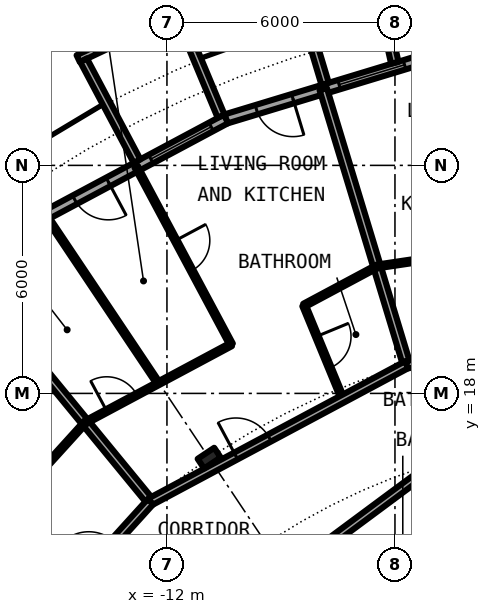
"""IFC4 building model, lengths in metres.
Left out: names, types, materials, properties, quantities, classifications, styles, units other than length and angle.
Written with IfcOpenShell. Run it as: python <this file> out.ifc"""

import sys

from ifc_helpers import new_model, si_unit, direction, frame, frame_2d, origin, origin_2d, place, context, subcontext, project, spatial, rectangle, circle, i_section, extrude, element, fill, save


model = new_model("IFC4")
c1 = context("Model", 3, precision=1e-05, world=origin(), true_north=direction((0.0, 1.0)))
c2 = subcontext(c1, "Body", "Model", "MODEL_VIEW")
j1 = project(units=[si_unit("LENGTHUNIT", "METRE"), si_unit("PLANEANGLEUNIT", "RADIAN")], contexts=[c1])
p1 = place(None, origin())
s1 = spatial("IfcSite", under=j1, at=p1, CompositionType="ELEMENT")
p2 = place(p1, origin())
s2 = spatial("IfcBuilding", under=s1, at=p2, CompositionType="ELEMENT")
p3 = place(p2, frame((0.0, 0.0, 75.8)))
s3 = spatial("IfcBuildingStorey", under=s2, at=p3, CompositionType="ELEMENT", Elevation=75.8)
p4 = place(p3, frame((-10.889, 16.297, 0.0), z_axis=(0.0, 0.0, 1.0), x_axis=(-0.55557023302, 0.831469612303, 0.0)))
e1 = element("IfcColumn", 1, at=p4, inside=s3, PredefinedType="COLUMN", context=c2, shape_type="SweptSolid", body=[
    extrude(i_section(OverallWidth=0.306, OverallDepth=0.524, WebThickness=0.021, FlangeThickness=0.04, FilletRadius=0.027, at=origin_2d()), origin(), (0.0, 0.0, 1.0), 3.05),
])
p5 = place(p3, frame((-5.326, 26.775, 0.0), z_axis=(0.0, 0.0, 1.0), x_axis=(-0.956965678721, -0.290201119486, 0.0)))
e2 = element("IfcWall", 2, at=p5, inside=s3, PredefinedType="SOLIDWALL", context=c2, shape_type="SweptSolid", body=[
    extrude(rectangle(XDim=5.351, YDim=0.25, at=frame_2d((2.676, 0.0))), origin(), (0.0, 0.0, 1.0), 2.7),
])
p6 = place(p5, frame((0.441, 0.0, 0.3)))
e3 = element("IfcOpeningElement", 3, at=p6, cuts=e2, PredefinedType="OPENING", context=c2, shape_type="SweptSolid", body=[
    extrude(rectangle(XDim=1.8, YDim=2.1, at=frame_2d((0.9, 1.05))), frame((0.0, 0.135, 0.0), z_axis=(0.0, -1.0, 0.0), x_axis=(1.0, 0.0, 0.0)), (0.0, 0.0, 1.0), 0.27),
])
p7 = place(p5, frame((3.51, 0.0, 0.0)))
e4 = element("IfcOpeningElement", 4, at=p7, cuts=e2, PredefinedType="OPENING", context=c2, shape_type="SweptSolid", body=[
    extrude(rectangle(XDim=1.0, YDim=2.2, at=frame_2d((0.5, 1.1))), frame((0.0, 0.135, 0.0), z_axis=(0.0, -1.0, 0.0), x_axis=(1.0, 0.0, 0.0)), (0.0, 0.0, 1.0), 0.27),
])
p8 = place(p3, frame((-6.004, 26.7, -0.03), z_axis=(0.0, 0.0, 1.0), x_axis=(-0.219609259383, 0.975587911566, 0.0)))
e5 = element("IfcWall", 5, at=p8, inside=s3, PredefinedType="SOLIDWALL", context=c2, shape_type="SweptSolid", body=[
    extrude(rectangle(XDim=2.933, YDim=0.2, at=frame_2d((1.466, 0.0))), origin(), (0.0, 0.0, 1.0), 2.73),
])
p9 = place(p3, frame((-7.837, 26.144, -0.03), z_axis=(0.0, 0.0, 1.0), x_axis=(-0.287064767992, 0.957911174889, 0.0)))
e6 = element("IfcWall", 6, at=p9, inside=s3, PredefinedType="SOLIDWALL", context=c2, shape_type="SweptSolid", body=[
    extrude(rectangle(XDim=3.006, YDim=0.2, at=frame_2d((1.503, 0.0))), origin(), (0.0, 0.0, 1.0), 2.73),
])
p10 = place(p3, frame((-10.447, 25.222, 0.0), z_axis=(0.0, 0.0, 1.0), x_axis=(-0.881915646801, -0.471407246368, 0.0)))
e7 = element("IfcWall", 7, at=p10, inside=s3, PredefinedType="SOLIDWALL", context=c2, shape_type="SweptSolid", body=[
    extrude(rectangle(XDim=5.352, YDim=0.25, at=frame_2d((2.676, 0.0))), origin(), (0.0, 0.0, 1.0), 2.7),
])
p11 = place(p10, frame((0.441, 0.0, 0.3)))
e8 = element("IfcOpeningElement", 8, at=p11, cuts=e7, PredefinedType="OPENING", context=c2, shape_type="SweptSolid", body=[
    extrude(rectangle(XDim=1.8, YDim=2.1, at=frame_2d((0.9, 1.05))), frame((0.0, 0.135, 0.0), z_axis=(0.0, -1.0, 0.0), x_axis=(1.0, 0.0, 0.0)), (0.0, 0.0, 1.0), 0.27),
])
p12 = place(p10, frame((3.51, 0.0, 0.0)))
e9 = element("IfcOpeningElement", 9, at=p12, cuts=e7, PredefinedType="OPENING", context=c2, shape_type="SweptSolid", body=[
    extrude(rectangle(XDim=1.0, YDim=2.2, at=frame_2d((0.5, 1.1))), frame((0.0, 0.135, 0.0), z_axis=(0.0, -1.0, 0.0), x_axis=(1.0, 0.0, 0.0)), (0.0, 0.0, 1.0), 0.27),
])
p13 = place(p3, frame((-11.629, 28.088, -0.03), z_axis=(0.0, 0.0, 1.0), x_axis=(-0.904000060331, -0.427532327342, 0.0)))
e10 = element("IfcWall", 10, at=p13, inside=s3, PredefinedType="SOLIDWALL", context=c2, shape_type="SweptSolid", body=[
    extrude(rectangle(XDim=2.993, YDim=0.2, at=frame_2d((1.497, 0.0))), origin(), (0.0, 0.0, 1.0), 2.73),
])
p14 = place(p13, frame((0.457, 0.0, 0.33)))
e11 = element("IfcOpeningElement", 11, at=p14, cuts=e10, PredefinedType="OPENING", context=c2, shape_type="SweptSolid", body=[
    extrude(circle(Radius=1.04, at=frame_2d((1.04, 1.04))), frame((0.0, 0.11, 0.0), z_axis=(0.0, -1.0, 0.0), x_axis=(1.0, 0.0, 0.0)), (0.0, 0.0, 1.0), 0.22),
])
p15 = place(p3, frame((-10.575, 25.295, -0.03), z_axis=(0.0, 0.0, 1.0), x_axis=(-0.385697364644, 0.922625353492, 0.0)))
e12 = element("IfcWall", 12, at=p15, inside=s3, PredefinedType="SOLIDWALL", context=c2, shape_type="SweptSolid", body=[
    extrude(rectangle(XDim=2.883, YDim=0.2, at=frame_2d((1.442, 0.0))), origin(), (0.0, 0.0, 1.0), 2.73),
])
p16 = place(p3, frame((-12.787, 24.113, -0.03), z_axis=(0.0, 0.0, 1.0), x_axis=(-0.468365282436, 0.883534924159, 0.0)))
e13 = element("IfcWall", 13, at=p16, inside=s3, PredefinedType="SOLIDWALL", context=c2, shape_type="SweptSolid", body=[
    extrude(rectangle(XDim=3.006, YDim=0.2, at=frame_2d((1.503, 0.0))), origin(), (0.0, 0.0, 1.0), 2.73),
])
p17 = place(p3, frame((-7.887, 26.005, 0.0), z_axis=(0.0, 0.0, 1.0), x_axis=(0.29005838641, -0.957008951094, 0.0)))
e14 = element("IfcWall", 14, at=p17, inside=s3, PredefinedType="PARTITIONING", context=c2, shape_type="SweptSolid", body=[
    extrude(rectangle(XDim=7.574, YDim=0.2, at=frame_2d((3.787, 0.0))), origin(), (0.0, 0.0, 1.0), 2.7),
])
p18 = place(p3, frame((-17.243, 21.005, 0.0), z_axis=(0.0, 0.0, 1.0), x_axis=(0.63447412651, -0.772944100689, 0.0)))
e15 = element("IfcWall", 15, at=p18, inside=s3, PredefinedType="PARTITIONING", context=c2, shape_type="SweptSolid", body=[
    extrude(rectangle(XDim=7.576, YDim=0.2, at=frame_2d((3.788, 0.0))), origin(), (0.0, 0.0, 1.0), 2.7),
])
p19 = place(p3, frame((-15.119, 22.581, 0.0), z_axis=(0.0, 0.0, 1.0), x_axis=(0.556271707676, -0.83100047367, 0.0)))
e16 = element("IfcWall", 16, at=p19, inside=s3, PredefinedType="PARTITIONING", context=c2, shape_type="SweptSolid", body=[
    extrude(rectangle(XDim=5.195, YDim=0.1, at=frame_2d((2.598, 0.0))), origin(), (0.0, 0.0, 1.0), 2.7),
])
p20 = place(p3, frame((-12.81, 23.966, 0.0), z_axis=(0.0, 0.0, 1.0), x_axis=(0.47140999111, -0.881914179658, 0.0)))
e17 = element("IfcWall", 17, at=p20, inside=s3, PredefinedType="PARTITIONING", context=c2, shape_type="SweptSolid", body=[
    extrude(rectangle(XDim=5.303, YDim=0.1, at=frame_2d((2.652, 0.0))), origin(), (0.0, 0.0, 1.0), 2.7),
])
p21 = place(p20, frame((2.202, 0.0, 0.0)))
e18 = element("IfcOpeningElement", 18, at=p21, cuts=e17, PredefinedType="OPENING", context=c2, shape_type="SweptSolid", body=[
    extrude(rectangle(XDim=0.9, YDim=2.3, at=frame_2d((0.45, 1.15))), frame((0.0, 0.06, 0.0), z_axis=(0.0, -1.0, 0.0), x_axis=(1.0, 0.0, 0.0)), (0.0, 0.0, 1.0), 0.12),
])
p22 = place(p3, frame((-8.392, 20.314, 0.0), z_axis=(0.0, 0.0, 1.0), x_axis=(0.38190329031, -0.924202292169, 0.0)))
e19 = element("IfcWall", 19, at=p22, inside=s3, PredefinedType="PARTITIONING", context=c2, shape_type="SweptSolid", body=[
    extrude(rectangle(XDim=2.661, YDim=0.1, at=frame_2d((1.33, 0.0))), origin(), (0.0, 0.0, 1.0), 2.7),
])
p23 = place(p22, frame((0.88, 0.0, 0.0)))
e20 = element("IfcOpeningElement", 20, at=p23, cuts=e19, PredefinedType="OPENING", context=c2, shape_type="SweptSolid", body=[
    extrude(rectangle(XDim=0.9, YDim=2.3, at=frame_2d((0.45, 1.15))), frame((0.0, 0.06, 0.0), z_axis=(0.0, -1.0, 0.0), x_axis=(1.0, 0.0, 0.0)), (0.0, 0.0, 1.0), 0.12),
])
p24 = place(p3, frame((-12.745, 10.358, 0.0), z_axis=(0.0, 0.0, 1.0), x_axis=(0.803191461888, 0.595720971219, 0.0)))
e21 = element("IfcWall", 21, at=p24, inside=s3, PredefinedType="PARTITIONING", context=c2, shape_type="SweptSolid", body=[
    extrude(rectangle(XDim=9.76, YDim=0.2, at=frame_2d((4.88, 0.0))), origin(), (0.0, 0.0, 1.0), 2.7),
])
p25 = place(p24, frame((4.38, 0.0, 0.0)))
e22 = element("IfcOpeningElement", 22, at=p25, cuts=e21, PredefinedType="OPENING", context=c2, shape_type="SweptSolid", body=[
    extrude(rectangle(XDim=1.0, YDim=2.3, at=frame_2d((0.5, 1.15))), frame((0.0, 0.11, 0.0), z_axis=(0.0, -1.0, 0.0), x_axis=(1.0, 0.0, 0.0)), (0.0, 0.0, 1.0), 0.22),
])
p26 = place(p3, frame((-12.434, 15.151, 0.0), z_axis=(0.0, 0.0, 1.0), x_axis=(0.881899173092, 0.47143806433, 0.0)))
e23 = element("IfcWall", 23, at=p26, inside=s3, PredefinedType="PARTITIONING", context=c2, shape_type="SweptSolid", body=[
    extrude(rectangle(XDim=7.647, YDim=0.2, at=frame_2d((3.824, 0.0))), origin(), (0.0, 0.0, 1.0), 2.38),
])
p27 = place(p26, frame((2.55, 0.0, 0.0)))
e24 = element("IfcOpeningElement", 24, at=p27, cuts=e23, PredefinedType="OPENING", context=c2, shape_type="SweptSolid", body=[
    extrude(rectangle(XDim=1.0, YDim=2.3, at=frame_2d((0.5, 1.15))), frame((0.0, 0.11, 0.0), z_axis=(0.0, -1.0, 0.0), x_axis=(1.0, 0.0, 0.0)), (0.0, 0.0, 1.0), 0.22),
])
p28 = place(p3, frame((-16.193, 11.004, 0.0), z_axis=(0.0, 0.0, 1.0), x_axis=(0.671601747072, 0.740912338492, 0.0)))
e25 = element("IfcWall", 25, at=p28, inside=s3, PredefinedType="PARTITIONING", context=c2, shape_type="SweptSolid", body=[
    extrude(rectangle(XDim=5.597, YDim=0.2, at=frame_2d((2.799, 0.0))), origin(), (0.0, 0.0, 1.0), 2.38),
])
p29 = place(p28, frame((3.18, 0.0, 0.0)))
e26 = element("IfcOpeningElement", 26, at=p29, cuts=e25, PredefinedType="OPENING", context=c2, shape_type="SweptSolid", body=[
    extrude(rectangle(XDim=1.0, YDim=2.3, at=frame_2d((0.5, 1.15))), frame((0.0, 0.11, 0.0), z_axis=(0.0, -1.0, 0.0), x_axis=(1.0, 0.0, 0.0)), (0.0, 0.0, 1.0), 0.22),
])
p30 = place(p3, frame((-5.69, 18.756, 0.0), z_axis=(0.0, 0.0, 1.0), x_axis=(0.989265547993, 0.146128968906, 0.0)))
e27 = element("IfcWall", 27, at=p30, inside=s3, PredefinedType="PARTITIONING", context=c2, shape_type="SweptSolid", body=[
    extrude(rectangle(XDim=1.771, YDim=0.2, at=frame_2d((0.885, 0.0))), origin(), (0.0, 0.0, 1.0), 2.38),
])
p31 = place(p3, frame((-14.148, 17.236, 0.0), z_axis=(0.0, 0.0, 1.0), x_axis=(0.881763472003, 0.471691826769, 0.0)))
e28 = element("IfcWall", 28, at=p31, inside=s3, PredefinedType="PARTITIONING", context=c2, shape_type="SweptSolid", body=[
    extrude(rectangle(XDim=4.35, YDim=0.1, at=frame_2d((2.175, 0.0))), origin(), (0.0, 0.0, 1.0), 2.7),
])
p32 = place(p31, frame((0.639, 0.0, 0.0)))
e29 = element("IfcOpeningElement", 29, at=p32, cuts=e28, PredefinedType="OPENING", context=c2, shape_type="SweptSolid", body=[
    extrude(rectangle(XDim=0.9, YDim=2.3, at=frame_2d((0.45, 1.15))), frame((0.0, 0.06, 0.0), z_axis=(0.0, -1.0, 0.0), x_axis=(1.0, 0.0, 0.0)), (0.0, 0.0, 1.0), 0.12),
])
p33 = place(p3, frame((-8.392, 20.314, 0.0), z_axis=(0.0, 0.0, 1.0), x_axis=(0.881864921102, 0.471502132476, 0.0)))
e30 = element("IfcWall", 30, at=p33, inside=s3, PredefinedType="PARTITIONING", context=c2, shape_type="SweptSolid", body=[
    extrude(rectangle(XDim=2.176, YDim=0.1, at=frame_2d((1.088, 0.0))), origin(), (0.0, 0.0, 1.0), 2.7),
])
p34 = place(p3, frame((-15.612, 15.622, 0.0), z_axis=(0.0, 0.0, 1.0), x_axis=(0.671674967707, 0.740845960882, 0.0)))
e31 = element("IfcWall", 31, at=p34, inside=s3, PredefinedType="PARTITIONING", context=c2, shape_type="SweptSolid", body=[
    extrude(rectangle(XDim=2.181, YDim=0.1, at=frame_2d((1.091, 0.0))), origin(), (0.0, 0.0, 1.0), 2.7),
])
p35 = place(p3, frame((-6.472, 21.34, 0.0), z_axis=(0.0, 0.0, 1.0), x_axis=(0.989185420695, 0.146670390618, 0.0)))
e32 = element("IfcWall", 32, at=p35, inside=s3, PredefinedType="PARTITIONING", context=c2, shape_type="SweptSolid", body=[
    extrude(rectangle(XDim=2.181, YDim=0.1, at=frame_2d((1.09, 0.0))), origin(), (0.0, 0.0, 1.0), 2.7),
])
p36 = place(p6, origin())
e33 = element("IfcWindow", 33, at=p36, inside=s3, PartitioningType="SINGLE_PANEL", PredefinedType="WINDOW", context=c2, shape_type="SweptSolid", body=[
    extrude(rectangle(XDim=1.8, YDim=2.1, at=frame_2d((0.9, 1.05))), frame((0.0, 0.03, 0.0), z_axis=(0.0, -1.0, 0.0), x_axis=(1.0, 0.0, 0.0)), (0.0, 0.0, 1.0), 0.06),
])
fill(e3, e33)
p37 = place(p7, origin())
e34 = element("IfcDoor", 34, at=p37, inside=s3, OperationType="SINGLE_SWING_LEFT", PredefinedType="DOOR", context=c2, shape_type="SweptSolid", body=[
    extrude(rectangle(XDim=1.0, YDim=2.2, at=frame_2d((0.5, 1.1))), frame((0.0, 0.025, 0.0), z_axis=(0.0, -1.0, 0.0), x_axis=(1.0, 0.0, 0.0)), (0.0, 0.0, 1.0), 0.05),
])
fill(e4, e34)
p38 = place(p11, origin())
e35 = element("IfcWindow", 35, at=p38, inside=s3, PartitioningType="SINGLE_PANEL", PredefinedType="WINDOW", context=c2, shape_type="SweptSolid", body=[
    extrude(rectangle(XDim=1.8, YDim=2.1, at=frame_2d((0.9, 1.05))), frame((0.0, 0.03, 0.0), z_axis=(0.0, -1.0, 0.0), x_axis=(1.0, 0.0, 0.0)), (0.0, 0.0, 1.0), 0.06),
])
fill(e8, e35)
p39 = place(p12, origin())
e36 = element("IfcDoor", 36, at=p39, inside=s3, OperationType="SINGLE_SWING_LEFT", PredefinedType="DOOR", context=c2, shape_type="SweptSolid", body=[
    extrude(rectangle(XDim=1.0, YDim=2.2, at=frame_2d((0.5, 1.1))), frame((0.0, 0.025, 0.0), z_axis=(0.0, -1.0, 0.0), x_axis=(1.0, 0.0, 0.0)), (0.0, 0.0, 1.0), 0.05),
])
fill(e9, e36)
p40 = place(p27, origin())
e37 = element("IfcDoor", 37, at=p40, inside=s3, OperationType="SINGLE_SWING_LEFT", PredefinedType="DOOR", context=c2, shape_type="SweptSolid", body=[
    extrude(rectangle(XDim=1.0, YDim=2.3, at=frame_2d((0.5, 1.15))), frame((0.0, 0.025, 0.0), z_axis=(0.0, -1.0, 0.0), x_axis=(1.0, 0.0, 0.0)), (0.0, 0.0, 1.0), 0.05),
])
fill(e24, e37)
p41 = place(p23, origin())
e38 = element("IfcDoor", 38, at=p41, inside=s3, OperationType="SINGLE_SWING_RIGHT", PredefinedType="DOOR", context=c2, shape_type="SweptSolid", body=[
    extrude(rectangle(XDim=0.9, YDim=2.3, at=frame_2d((0.45, 1.15))), frame((0.0, 0.025, 0.0), z_axis=(0.0, -1.0, 0.0), x_axis=(1.0, 0.0, 0.0)), (0.0, 0.0, 1.0), 0.05),
])
fill(e20, e38)
p42 = place(p21, origin())
e39 = element("IfcDoor", 39, at=p42, inside=s3, OperationType="SINGLE_SWING_RIGHT", PredefinedType="DOOR", context=c2, shape_type="SweptSolid", body=[
    extrude(rectangle(XDim=0.9, YDim=2.3, at=frame_2d((0.45, 1.15))), frame((0.0, 0.025, 0.0), z_axis=(0.0, -1.0, 0.0), x_axis=(1.0, 0.0, 0.0)), (0.0, 0.0, 1.0), 0.05),
])
fill(e18, e39)
p43 = place(p32, origin())
e40 = element("IfcDoor", 40, at=p43, inside=s3, OperationType="SINGLE_SWING_LEFT", PredefinedType="DOOR", context=c2, shape_type="SweptSolid", body=[
    extrude(rectangle(XDim=0.9, YDim=2.3, at=frame_2d((0.45, 1.15))), frame((0.0, 0.025, 0.0), z_axis=(0.0, -1.0, 0.0), x_axis=(1.0, 0.0, 0.0)), (0.0, 0.0, 1.0), 0.05),
])
fill(e29, e40)
save(model, sys.argv[1])
